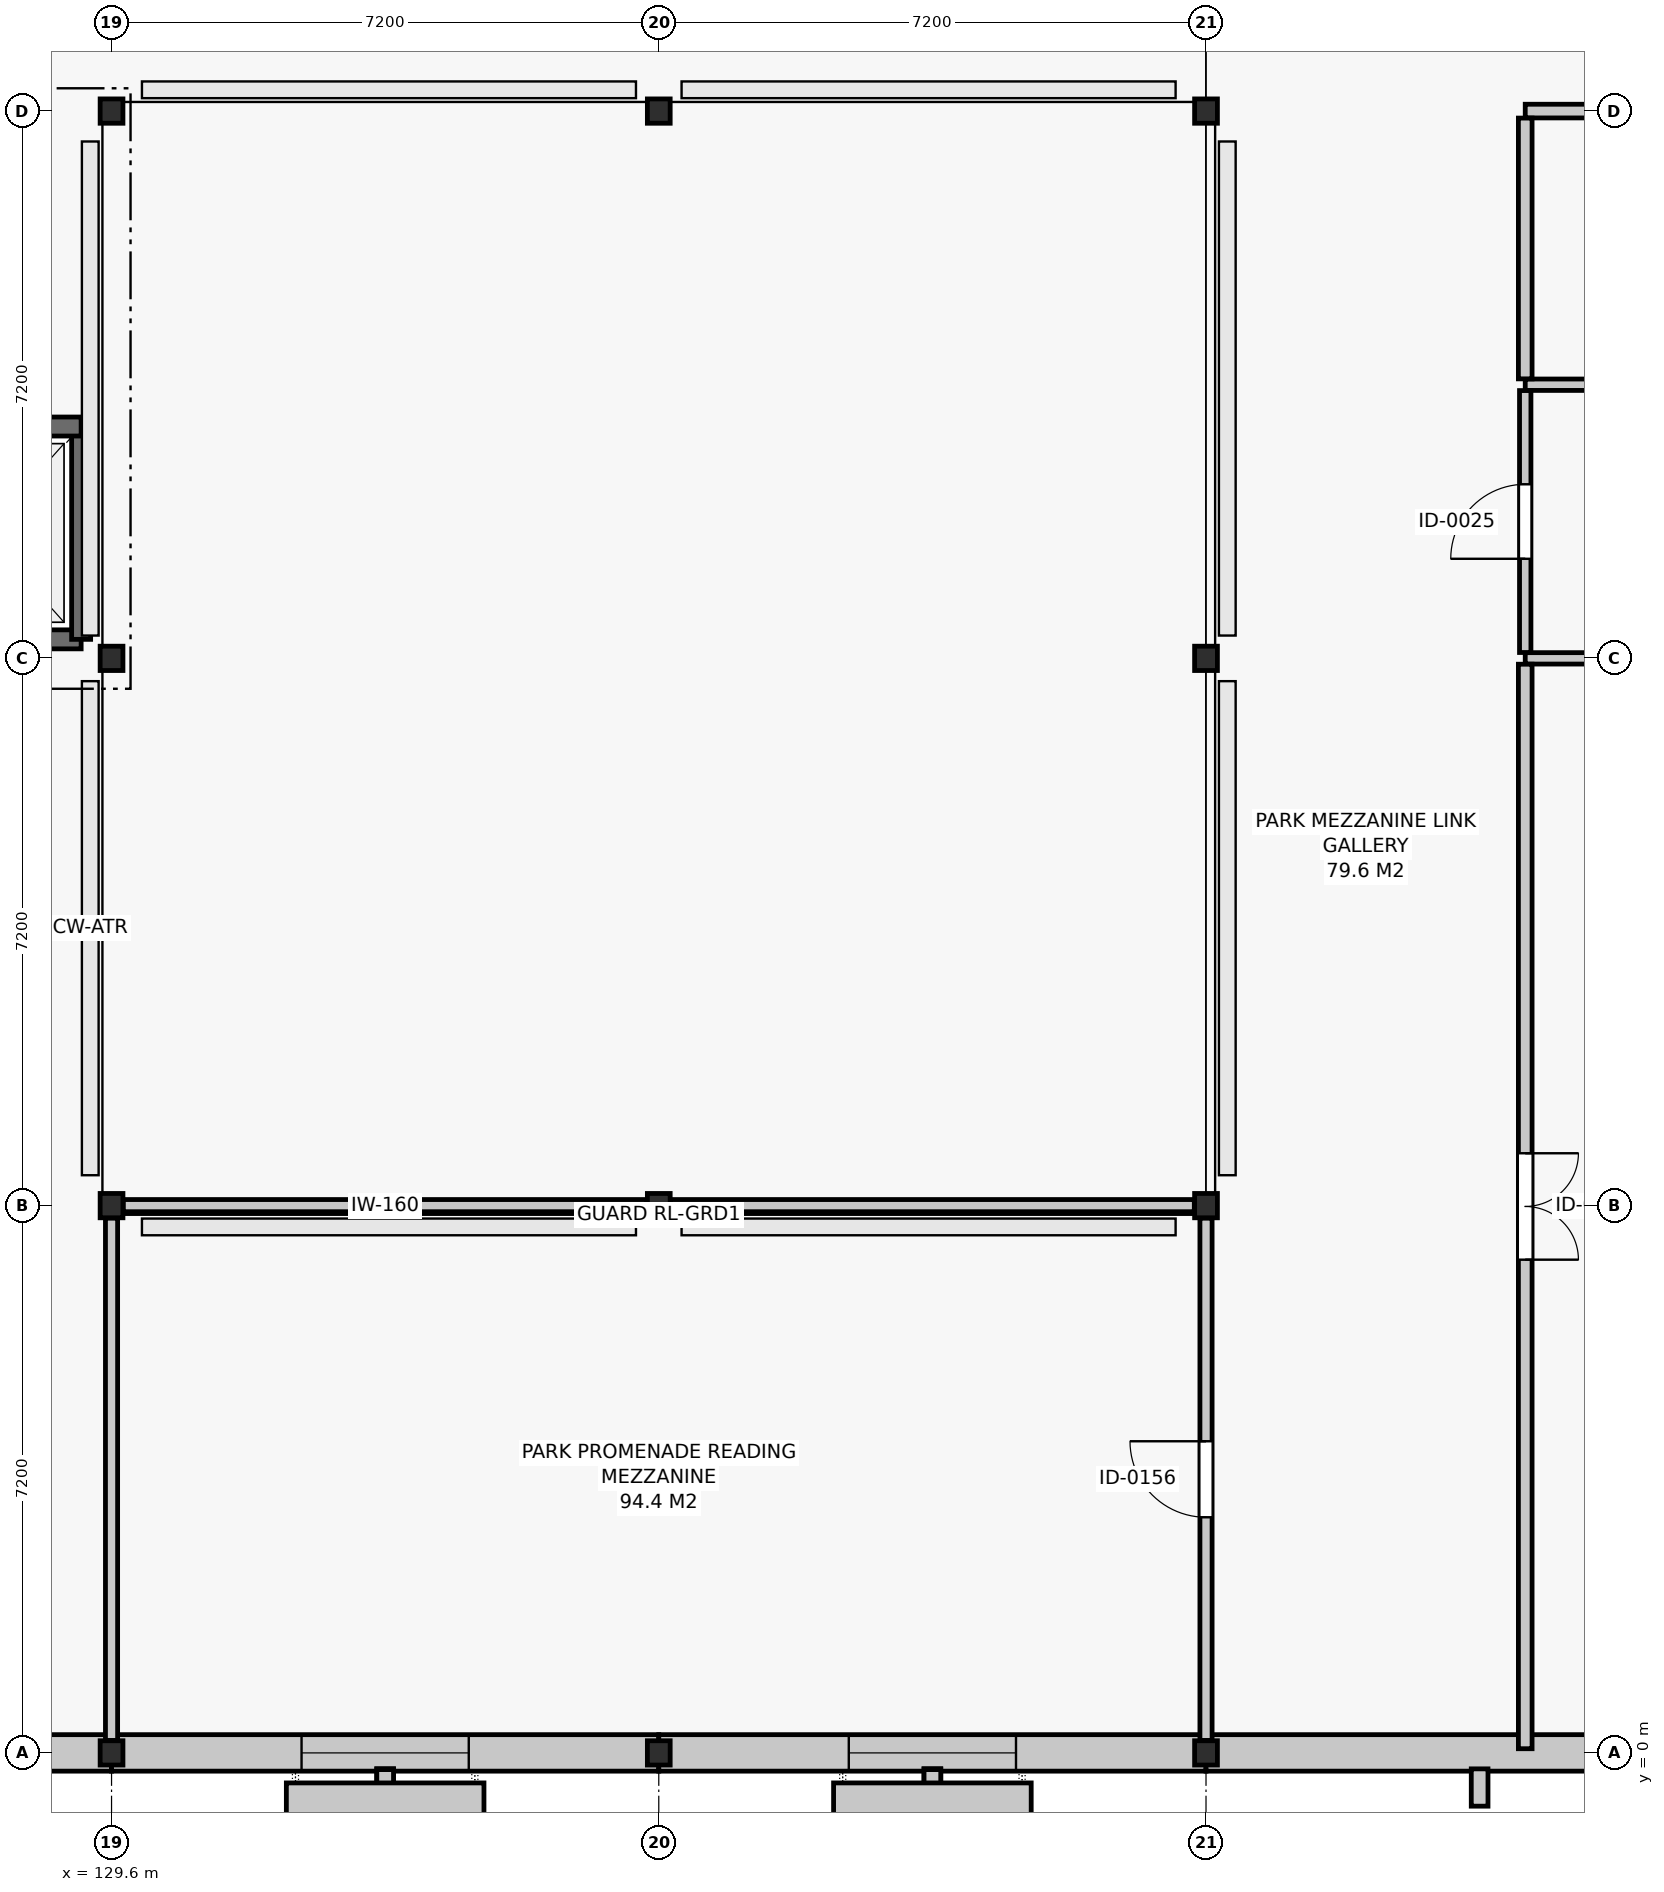
"""IFC4 building model, lengths in metres.
Left out: names, types, materials, properties, quantities, classifications, styles, units other than length and angle.
Written with IfcOpenShell. Run it as: python <this file> out.ifc"""

import sys

from ifc_helpers import new_model, si_unit, direction, frame, frame_2d, origin, origin_2d, place, context, subcontext, project, spatial, rectangle, i_section, extrude, element, fill, save


model = new_model("IFC4")
c1 = context("Model", 3, precision=1e-05, world=origin(), true_north=direction((0.0, 1.0)))
c2 = subcontext(c1, "Body", "Model", "MODEL_VIEW")
j1 = project(units=[si_unit("LENGTHUNIT", "METRE"), si_unit("PLANEANGLEUNIT", "RADIAN")], contexts=[c1])
p1 = place(None, origin())
s1 = spatial("IfcSite", under=j1, at=p1, CompositionType="ELEMENT")
p2 = place(p1, origin())
s2 = spatial("IfcBuilding", under=s1, at=p2, CompositionType="ELEMENT")
p3 = place(p2, frame((0.0, 0.0, 5.4)))
s3 = spatial("IfcBuildingStorey", under=s2, at=p3, CompositionType="ELEMENT", Elevation=5.4)
for number, where, z_axis, x_axis in (
    (1, (129.6, 0.0, 0.0), (0.0, 0.0, 1.0), (1.0, 0.0, 0.0)),
    (2, (129.6, 7.2, 0.0), (0.0, 0.0, 1.0), (1.0, 0.0, 0.0)),
    (3, (129.6, 14.4, 0.0), (0.0, 0.0, 1.0), (1.0, 0.0, 0.0)),
    (4, (129.6, 21.6, 0.0), (0.0, 0.0, 1.0), (1.0, 0.0, 0.0)),
    (5, (136.8, 0.0, 0.0), (0.0, 0.0, 1.0), (1.0, 0.0, 0.0)),
    (6, (136.8, 7.2, 0.0), (0.0, 0.0, 1.0), (1.0, 0.0, 0.0)),
    (7, (136.8, 21.6, 0.0), (0.0, 0.0, 1.0), (1.0, 0.0, 0.0)),
    (8, (144.0, 0.0, 0.0), (0.0, 0.0, 1.0), (1.0, 0.0, 0.0)),
    (9, (144.0, 7.2, 0.0), (0.0, 0.0, 1.0), (1.0, 0.0, 0.0)),
    (10, (144.0, 14.4, 0.0), (0.0, 0.0, 1.0), (1.0, 0.0, 0.0)),
    (11, (144.0, 21.6, 0.0), (0.0, 0.0, 1.0), (1.0, 0.0, 0.0)),
):
    element("IfcColumn", number, at=place(p3, frame(where, z_axis=z_axis, x_axis=x_axis)), inside=s3, PredefinedType="COLUMN", context=c2, shape_type="SweptSolid", body=[
        extrude(i_section(OverallWidth=0.3, OverallDepth=0.32, WebThickness=0.011, FlangeThickness=0.021, FilletRadius=0.027, at=origin_2d()), origin(), (0.0, 0.0, 1.0), 4.8),
    ])
p4 = place(p3, frame((122.554, 0.0, 0.0), z_axis=(0.0, 0.0, 1.0), x_axis=(1.0, 0.0, 0.0)))
e12 = element("IfcWall", 12, at=p4, inside=s3, PredefinedType="SOLIDWALL", context=c2, shape_type="SweptSolid", body=[
    extrude(rectangle(XDim=7.046, YDim=0.48, at=frame_2d((3.523, 0.0))), origin(), (0.0, 0.0, 1.0), 3.8),
])
p5 = place(p4, frame((2.346, 0.0, 0.9)))
e13 = element("IfcOpeningElement", 13, at=p5, cuts=e12, PredefinedType="OPENING", context=c2, shape_type="SweptSolid", body=[
    extrude(rectangle(XDim=2.2, YDim=2.25, at=frame_2d((1.1, 1.125))), frame((0.0, 0.252, 0.0), z_axis=(0.0, -1.0, 0.0), x_axis=(1.0, 0.0, 0.0)), (0.0, 0.0, 1.0), 0.504),
])
p6 = place(p3, frame((129.6, 0.0, 0.0), z_axis=(0.0, 0.0, 1.0), x_axis=(1.0, 0.0, 0.0)))
e14 = element("IfcWall", 14, at=p6, inside=s3, PredefinedType="SOLIDWALL", context=c2, shape_type="SweptSolid", body=[
    extrude(rectangle(XDim=7.2, YDim=0.48, at=frame_2d((3.6, 0.0))), origin(), (0.0, 0.0, 1.0), 3.8),
])
p7 = place(p6, frame((2.5, 0.0, 0.9)))
e15 = element("IfcOpeningElement", 15, at=p7, cuts=e14, PredefinedType="OPENING", context=c2, shape_type="SweptSolid", body=[
    extrude(rectangle(XDim=2.2, YDim=2.25, at=frame_2d((1.1, 1.125))), frame((0.0, 0.252, 0.0), z_axis=(0.0, -1.0, 0.0), x_axis=(1.0, 0.0, 0.0)), (0.0, 0.0, 1.0), 0.504),
])
p8 = place(p3, frame((136.8, 0.0, 0.0), z_axis=(0.0, 0.0, 1.0), x_axis=(1.0, 0.0, 0.0)))
e16 = element("IfcWall", 16, at=p8, inside=s3, PredefinedType="SOLIDWALL", context=c2, shape_type="SweptSolid", body=[
    extrude(rectangle(XDim=7.2, YDim=0.48, at=frame_2d((3.6, 0.0))), origin(), (0.0, 0.0, 1.0), 3.8),
])
p9 = place(p8, frame((2.5, 0.0, 0.9)))
e17 = element("IfcOpeningElement", 17, at=p9, cuts=e16, PredefinedType="OPENING", context=c2, shape_type="SweptSolid", body=[
    extrude(rectangle(XDim=2.2, YDim=2.25, at=frame_2d((1.1, 1.125))), frame((0.0, 0.252, 0.0), z_axis=(0.0, -1.0, 0.0), x_axis=(1.0, 0.0, 0.0)), (0.0, 0.0, 1.0), 0.504),
])
p10 = place(p3, frame((144.0, 0.0, 0.0), z_axis=(0.0, 0.0, 1.0), x_axis=(1.0, 0.0, 0.0)))
e18 = element("IfcWall", 18, at=p10, inside=s3, PredefinedType="SOLIDWALL", context=c2, shape_type="SweptSolid", body=[
    extrude(rectangle(XDim=7.2, YDim=0.48, at=frame_2d((3.6, 0.0))), origin(), (0.0, 0.0, 1.0), 3.8),
])
p11 = place(p3, frame((126.65, 14.65, 0.0), z_axis=(0.0, 0.0, 1.0), x_axis=(1.0, 0.0, 0.0)))
e19 = element("IfcWall", 19, at=p11, inside=s3, PredefinedType="SHEAR", context=c2, shape_type="SweptSolid", body=[
    extrude(rectangle(XDim=2.55, YDim=0.25, at=frame_2d((1.275, 0.0))), origin(), (0.0, 0.0, 1.0), 4.52),
])
p12 = place(p3, frame((129.2, 14.65, 0.0), z_axis=(0.0, 0.0, 1.0), x_axis=(0.0, 1.0, 0.0)))
e20 = element("IfcWall", 20, at=p12, inside=s3, PredefinedType="SHEAR", context=c2, shape_type="SweptSolid", body=[
    extrude(rectangle(XDim=2.8, YDim=0.25, at=frame_2d((1.4, 0.0))), origin(), (0.0, 0.0, 1.0), 4.52),
])
p13 = place(p3, frame((129.2, 17.45, 0.0), z_axis=(0.0, 0.0, 1.0), x_axis=(-1.0, 0.0, 0.0)))
e21 = element("IfcWall", 21, at=p13, inside=s3, PredefinedType="SHEAR", context=c2, shape_type="SweptSolid", body=[
    extrude(rectangle(XDim=2.55, YDim=0.25, at=frame_2d((1.275, 0.0))), origin(), (0.0, 0.0, 1.0), 4.52),
])
p14 = place(p13, frame((0.725, 0.0, 0.0)))
e22 = element("IfcOpeningElement", 22, at=p14, cuts=e21, PredefinedType="OPENING", context=c2, shape_type="SweptSolid", body=[
    extrude(rectangle(XDim=1.1, YDim=2.1, at=frame_2d((0.55, 1.05))), frame((0.0, 0.137, 0.0), z_axis=(0.0, -1.0, 0.0), x_axis=(1.0, 0.0, 0.0)), (0.0, 0.0, 1.0), 0.274),
])
p15 = place(p3, frame((148.2, 14.4, 0.0), z_axis=(0.0, 0.0, 1.0), x_axis=(1.0, 0.0, 0.0)))
e23 = element("IfcWall", 23, at=p15, inside=s3, PredefinedType="PARTITIONING", context=c2, shape_type="SweptSolid", body=[
    extrude(rectangle(XDim=2.846, YDim=0.15, at=frame_2d((1.423, 0.0))), origin(), (0.0, 0.0, 1.0), 4.115),
])
p16 = place(p3, frame((148.2, 18.0, 0.0), z_axis=(0.0, 0.0, 1.0), x_axis=(1.0, 0.0, 0.0)))
e24 = element("IfcWall", 24, at=p16, inside=s3, PredefinedType="PARTITIONING", context=c2, shape_type="SweptSolid", body=[
    extrude(rectangle(XDim=6.6, YDim=0.15, at=frame_2d((3.3, 0.0))), origin(), (0.0, 0.0, 1.0), 4.065),
])
p17 = place(p3, frame((129.754, 7.2, 0.0), z_axis=(0.0, 0.0, 1.0), x_axis=(1.0, 0.0, 0.0)))
e25 = element("IfcWall", 25, at=p17, inside=s3, PredefinedType="PARTITIONING", context=c2, shape_type="SweptSolid", body=[
    extrude(rectangle(XDim=6.892, YDim=0.16, at=frame_2d((3.446, 0.0))), origin(), (0.0, 0.0, 1.0), 4.115),
])
p18 = place(p3, frame((136.954, 7.2, 0.0), z_axis=(0.0, 0.0, 1.0), x_axis=(1.0, 0.0, 0.0)))
e26 = element("IfcWall", 26, at=p18, inside=s3, PredefinedType="PARTITIONING", context=c2, shape_type="SweptSolid", body=[
    extrude(rectangle(XDim=6.892, YDim=0.16, at=frame_2d((3.446, 0.0))), origin(), (0.0, 0.0, 1.0), 4.115),
])
p19 = place(p3, frame((148.2, 21.6, 0.0), z_axis=(0.0, 0.0, 1.0), x_axis=(1.0, 0.0, 0.0)))
e27 = element("IfcWall", 27, at=p19, inside=s3, PredefinedType="PARTITIONING", context=c2, shape_type="SweptSolid", body=[
    extrude(rectangle(XDim=2.846, YDim=0.18, at=frame_2d((1.423, 0.0))), origin(), (0.0, 0.0, 1.0), 4.115),
])
p20 = place(p3, frame((148.2, 14.477, 0.0), z_axis=(0.0, 0.0, 1.0), x_axis=(0.0, 1.0, 0.0)))
e28 = element("IfcWall", 28, at=p20, inside=s3, PredefinedType="PARTITIONING", context=c2, shape_type="SweptSolid", body=[
    extrude(rectangle(XDim=3.446, YDim=0.15, at=frame_2d((1.723, 0.0))), origin(), (0.0, 0.0, 1.0), 4.115),
])
p21 = place(p20, frame((1.233, 0.0, 0.0)))
e29 = element("IfcOpeningElement", 29, at=p21, cuts=e28, PredefinedType="OPENING", context=c2, shape_type="SweptSolid", body=[
    extrude(rectangle(XDim=0.98, YDim=2.1, at=frame_2d((0.49, 1.05))), frame((0.0, 0.087, 0.0), z_axis=(0.0, -1.0, 0.0), x_axis=(1.0, 0.0, 0.0)), (0.0, 0.0, 1.0), 0.174),
])
p22 = place(p3, frame((129.6, 0.164, 0.0), z_axis=(0.0, 0.0, 1.0), x_axis=(0.0, 1.0, 0.0)))
e30 = element("IfcWall", 30, at=p22, inside=s3, PredefinedType="PARTITIONING", context=c2, shape_type="SweptSolid", body=[
    extrude(rectangle(XDim=6.872, YDim=0.16, at=frame_2d((3.436, 0.0))), origin(), (0.0, 0.0, 1.0), 4.065),
])
p23 = place(p3, frame((144.0, 0.164, 0.0), z_axis=(0.0, 0.0, 1.0), x_axis=(0.0, 1.0, 0.0)))
e31 = element("IfcWall", 31, at=p23, inside=s3, PredefinedType="PARTITIONING", context=c2, shape_type="SweptSolid", body=[
    extrude(rectangle(XDim=6.872, YDim=0.16, at=frame_2d((3.436, 0.0))), origin(), (0.0, 0.0, 1.0), 4.065),
])
p24 = place(p23, frame((2.936, 0.0, 0.0)))
e32 = element("IfcOpeningElement", 32, at=p24, cuts=e31, PredefinedType="OPENING", context=c2, shape_type="SweptSolid", body=[
    extrude(rectangle(XDim=1.0, YDim=2.15, at=frame_2d((0.5, 1.075))), frame((0.0, 0.092, 0.0), z_axis=(0.0, -1.0, 0.0), x_axis=(1.0, 0.0, 0.0)), (0.0, 0.0, 1.0), 0.184),
])
p25 = place(p3, frame((148.2, 18.077, 0.0), z_axis=(0.0, 0.0, 1.0), x_axis=(0.0, 1.0, 0.0)))
e33 = element("IfcWall", 33, at=p25, inside=s3, PredefinedType="PARTITIONING", context=c2, shape_type="SweptSolid", body=[
    extrude(rectangle(XDim=3.431, YDim=0.18, at=frame_2d((1.716, 0.0))), origin(), (0.0, 0.0, 1.0), 4.115),
])
p26 = place(p3, frame((148.2, 0.055, 0.0), z_axis=(0.0, 0.0, 1.0), x_axis=(0.0, 1.0, 0.0)))
e34 = element("IfcWall", 34, at=p26, inside=s3, PredefinedType="PARTITIONING", context=c2, shape_type="SweptSolid", body=[
    extrude(rectangle(XDim=14.268, YDim=0.18, at=frame_2d((7.134, 0.0))), origin(), (0.0, 0.0, 1.0), 3.955),
])
p27 = place(p26, frame((6.434, 0.0, 0.0)))
e35 = element("IfcOpeningElement", 35, at=p27, cuts=e34, PredefinedType="OPENING", context=c2, shape_type="SweptSolid", body=[
    extrude(rectangle(XDim=1.4, YDim=2.2, at=frame_2d((0.7, 1.1))), frame((0.0, 0.102, 0.0), z_axis=(0.0, -1.0, 0.0), x_axis=(1.0, 0.0, 0.0)), (0.0, 0.0, 1.0), 0.204),
])
p28 = place(p7, origin())
e36 = element("IfcWindow", 36, at=p28, inside=s3, PartitioningType="SINGLE_PANEL", PredefinedType="WINDOW", context=c2, shape_type="SweptSolid", body=[
    extrude(rectangle(XDim=2.2, YDim=2.25, at=frame_2d((1.1, 1.125))), frame((0.0, 0.03, 0.0), z_axis=(0.0, -1.0, 0.0), x_axis=(1.0, 0.0, 0.0)), (0.0, 0.0, 1.0), 0.06),
])
fill(e15, e36)
p29 = place(p9, origin())
e37 = element("IfcWindow", 37, at=p29, inside=s3, PartitioningType="SINGLE_PANEL", PredefinedType="WINDOW", context=c2, shape_type="SweptSolid", body=[
    extrude(rectangle(XDim=2.2, YDim=2.25, at=frame_2d((1.1, 1.125))), frame((0.0, 0.03, 0.0), z_axis=(0.0, -1.0, 0.0), x_axis=(1.0, 0.0, 0.0)), (0.0, 0.0, 1.0), 0.06),
])
fill(e17, e37)
p30 = place(p21, origin())
e38 = element("IfcDoor", 38, at=p30, inside=s3, OperationType="SINGLE_SWING_LEFT", PredefinedType="DOOR", context=c2, shape_type="SweptSolid", body=[
    extrude(rectangle(XDim=0.98, YDim=2.1, at=frame_2d((0.49, 1.05))), frame((0.0, 0.025, 0.0), z_axis=(0.0, -1.0, 0.0), x_axis=(1.0, 0.0, 0.0)), (0.0, 0.0, 1.0), 0.05),
])
fill(e29, e38)
p31 = place(p24, origin())
e39 = element("IfcDoor", 39, at=p31, inside=s3, OperationType="SINGLE_SWING_RIGHT", PredefinedType="DOOR", context=c2, shape_type="SweptSolid", body=[
    extrude(rectangle(XDim=1.0, YDim=2.15, at=frame_2d((0.5, 1.075))), frame((0.0, 0.025, 0.0), z_axis=(0.0, -1.0, 0.0), x_axis=(1.0, 0.0, 0.0)), (0.0, 0.0, 1.0), 0.05),
])
fill(e32, e39)
p32 = place(p27, frame((1.4, 0.0, 0.0), z_axis=(0.0, 0.0, 1.0), x_axis=(-1.0, 0.0, 0.0)))
e40 = element("IfcDoor", 40, at=p32, inside=s3, OperationType="DOUBLE_DOOR_SINGLE_SWING", PredefinedType="DOOR", context=c2, shape_type="SweptSolid", body=[
    extrude(rectangle(XDim=1.4, YDim=2.2, at=frame_2d((0.7, 1.1))), frame((0.0, 0.025, 0.0), z_axis=(0.0, -1.0, 0.0), x_axis=(1.0, 0.0, 0.0)), (0.0, 0.0, 1.0), 0.05),
])
fill(e35, e40)
save(model, sys.argv[1])
